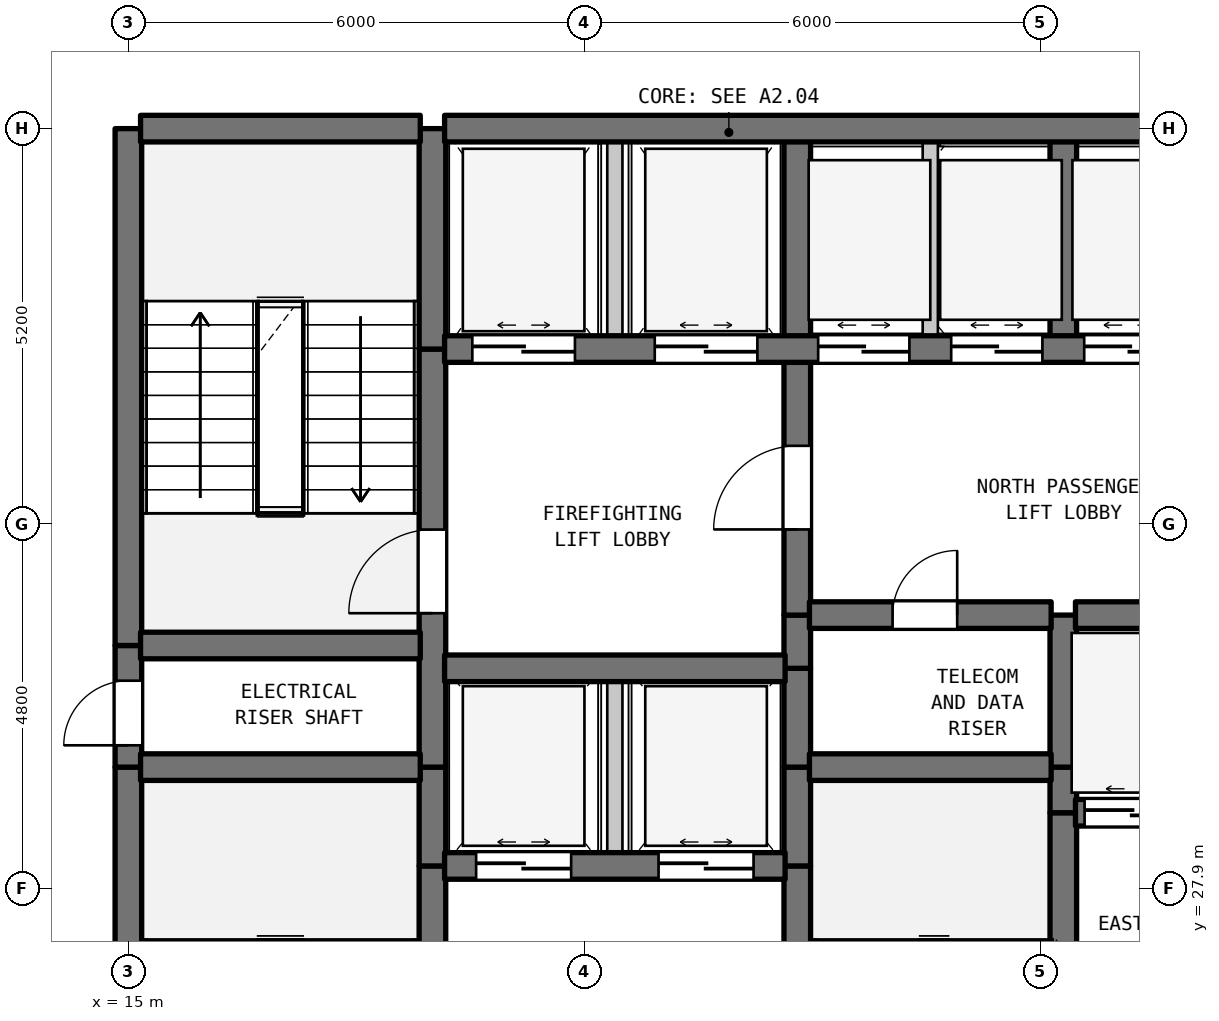
"""IFC4 building model, lengths in metres.
Left out: names, types, materials, properties, quantities, classifications, styles, units other than length and angle.
Written with IfcOpenShell. Run it as: python <this file> out.ifc"""

import sys

from ifc_helpers import new_model, si_unit, direction, frame, frame_2d, origin, place, context, subcontext, project, spatial, rectangle, extrude, element, fill, save


model = new_model("IFC4")
c1 = context("Model", 3, precision=1e-05, world=origin(), true_north=direction((0.0, 1.0)))
c2 = subcontext(c1, "Body", "Model", "MODEL_VIEW")
j1 = project(units=[si_unit("LENGTHUNIT", "METRE"), si_unit("PLANEANGLEUNIT", "RADIAN")], contexts=[c1])
p1 = place(None, origin())
s1 = spatial("IfcSite", under=j1, at=p1, CompositionType="ELEMENT")
p2 = place(p1, origin())
s2 = spatial("IfcBuilding", under=s1, at=p2, CompositionType="ELEMENT")
p3 = place(p2, frame((0.0, 0.0, 13.0)))
s3 = spatial("IfcBuildingStorey", under=s2, at=p3, CompositionType="ELEMENT", Elevation=13.0)
p4 = place(p3, frame((15.0, 22.7, 0.0), z_axis=(0.0, 0.0, 1.0), x_axis=(0.0, 1.0, 0.0)))
e1 = element("IfcWall", 1, at=p4, inside=s3, PredefinedType="SHEAR", context=c2, shape_type="SweptSolid", body=[
    extrude(rectangle(XDim=6.8, YDim=0.35, at=frame_2d((3.4, 0.0))), origin(), (0.0, 0.0, 1.0), 5.58),
])
p5 = place(p3, frame((15.0, 29.5, 0.0), z_axis=(0.0, 0.0, 1.0), x_axis=(0.0, 1.0, 0.0)))
e2 = element("IfcWall", 2, at=p5, inside=s3, PredefinedType="SHEAR", context=c2, shape_type="SweptSolid", body=[
    extrude(rectangle(XDim=1.6, YDim=0.35, at=frame_2d((0.8, 0.0))), origin(), (0.0, 0.0, 1.0), 5.58),
])
p6 = place(p5, frame((0.287, 0.0, 0.0)))
e3 = element("IfcOpeningElement", 3, at=p6, cuts=e2, PredefinedType="OPENING", context=c2, shape_type="SweptSolid", body=[
    extrude(rectangle(XDim=0.85, YDim=2.1, at=frame_2d((0.425, 1.05))), frame((0.0, 0.185, 0.0), z_axis=(0.0, -1.0, 0.0), x_axis=(1.0, 0.0, 0.0)), (0.0, 0.0, 1.0), 0.37),
])
p7 = place(p3, frame((15.0, 31.1, 0.0), z_axis=(0.0, 0.0, 1.0), x_axis=(0.0, 1.0, 0.0)))
e4 = element("IfcWall", 4, at=p7, inside=s3, PredefinedType="SHEAR", context=c2, shape_type="SweptSolid", body=[
    extrude(rectangle(XDim=6.8, YDim=0.35, at=frame_2d((3.4, 0.0))), origin(), (0.0, 0.0, 1.0), 5.58),
])
p8 = place(p3, frame((19.0, 22.7, 0.0), z_axis=(0.0, 0.0, 1.0), x_axis=(0.0, 1.0, 0.0)))
e5 = element("IfcWall", 5, at=p8, inside=s3, PredefinedType="SHEAR", context=c2, shape_type="SweptSolid", body=[
    extrude(rectangle(XDim=5.5, YDim=0.35, at=frame_2d((2.75, 0.0))), origin(), (0.0, 0.0, 1.0), 5.58),
])
p9 = place(p8, frame((0.631, 0.0, 0.0)))
e6 = element("IfcOpeningElement", 6, at=p9, cuts=e5, PredefinedType="OPENING", context=c2, shape_type="SweptSolid", body=[
    extrude(rectangle(XDim=1.1, YDim=2.15, at=frame_2d((0.55, 1.075))), frame((0.0, 0.185, 0.0), z_axis=(0.0, -1.0, 0.0), x_axis=(1.0, 0.0, 0.0)), (0.0, 0.0, 1.0), 0.37),
])
p10 = place(p3, frame((19.0, 28.2, 0.0), z_axis=(0.0, 0.0, 1.0), x_axis=(0.0, 1.0, 0.0)))
e7 = element("IfcWall", 7, at=p10, inside=s3, PredefinedType="SHEAR", context=c2, shape_type="SweptSolid", body=[
    extrude(rectangle(XDim=1.3, YDim=0.35, at=frame_2d((0.65, 0.0))), origin(), (0.0, 0.0, 1.0), 5.58),
])
p11 = place(p3, frame((19.0, 29.5, 0.0), z_axis=(0.0, 0.0, 1.0), x_axis=(0.0, 1.0, 0.0)))
e8 = element("IfcWall", 8, at=p11, inside=s3, PredefinedType="SHEAR", context=c2, shape_type="SweptSolid", body=[
    extrude(rectangle(XDim=5.5, YDim=0.35, at=frame_2d((2.75, 0.0))), origin(), (0.0, 0.0, 1.0), 5.58),
])
p12 = place(p11, frame((2.025, 0.0, 0.0)))
e9 = element("IfcOpeningElement", 9, at=p12, cuts=e8, PredefinedType="OPENING", context=c2, shape_type="SweptSolid", body=[
    extrude(rectangle(XDim=1.1, YDim=2.15, at=frame_2d((0.55, 1.075))), frame((0.0, 0.185, 0.0), z_axis=(0.0, -1.0, 0.0), x_axis=(1.0, 0.0, 0.0)), (0.0, 0.0, 1.0), 0.37),
])
p13 = place(p3, frame((19.0, 35.0, 0.0), z_axis=(0.0, 0.0, 1.0), x_axis=(0.0, 1.0, 0.0)))
e10 = element("IfcWall", 10, at=p13, inside=s3, PredefinedType="SHEAR", context=c2, shape_type="SweptSolid", body=[
    extrude(rectangle(XDim=2.9, YDim=0.35, at=frame_2d((1.45, 0.0))), origin(), (0.0, 0.0, 1.0), 5.58),
])
p14 = place(p3, frame((21.4, 28.2, 0.0), z_axis=(0.0, 0.0, 1.0), x_axis=(0.0, 1.0, 0.0)))
e11 = element("IfcWall", 11, at=p14, inside=s3, PredefinedType="STANDARD", context=c2, shape_type="SweptSolid", body=[
    extrude(rectangle(XDim=2.6, YDim=0.2, at=frame_2d((1.3, 0.0))), origin(), (0.0, 0.0, 1.0), 5.58),
])
p15 = place(p3, frame((21.4, 35.0, 0.0), z_axis=(0.0, 0.0, 1.0), x_axis=(0.0, 1.0, 0.0)))
e12 = element("IfcWall", 12, at=p15, inside=s3, PredefinedType="STANDARD", context=c2, shape_type="SweptSolid", body=[
    extrude(rectangle(XDim=2.9, YDim=0.2, at=frame_2d((1.45, 0.0))), origin(), (0.0, 0.0, 1.0), 5.58),
])
p16 = place(p3, frame((23.8, 22.7, 0.0), z_axis=(0.0, 0.0, 1.0), x_axis=(0.0, 1.0, 0.0)))
e13 = element("IfcWall", 13, at=p16, inside=s3, PredefinedType="SHEAR", context=c2, shape_type="SweptSolid", body=[
    extrude(rectangle(XDim=5.5, YDim=0.35, at=frame_2d((2.75, 0.0))), origin(), (0.0, 0.0, 1.0), 5.58),
])
p17 = place(p16, frame((0.235, 0.0, 0.0)))
e14 = element("IfcOpeningElement", 14, at=p17, cuts=e13, PredefinedType="OPENING", context=c2, shape_type="SweptSolid", body=[
    extrude(rectangle(XDim=1.1, YDim=2.15, at=frame_2d((0.55, 1.075))), frame((0.0, 0.185, 0.0), z_axis=(0.0, -1.0, 0.0), x_axis=(1.0, 0.0, 0.0)), (0.0, 0.0, 1.0), 0.37),
])
for number, where, z_axis, x_axis in (
    (15, (23.8, 28.2, 0.0), (0.0, 0.0, 1.0), (0.0, 1.0, 0.0)),
    (16, (23.8, 29.5, 0.0), (0.0, 0.0, 1.0), (0.0, 1.0, 0.0)),
):
    element("IfcWall", number, at=place(p3, frame(where, z_axis=z_axis, x_axis=x_axis)), inside=s3, PredefinedType="SHEAR", context=c2, shape_type="SweptSolid", body=[
        extrude(rectangle(XDim=1.3, YDim=0.35, at=frame_2d((0.65, 0.0))), origin(), (0.0, 0.0, 1.0), 5.58),
    ])
p18 = place(p3, frame((23.8, 30.8, 0.0), z_axis=(0.0, 0.0, 1.0), x_axis=(0.0, 1.0, 0.0)))
e17 = element("IfcWall", 17, at=p18, inside=s3, PredefinedType="SHEAR", context=c2, shape_type="SweptSolid", body=[
    extrude(rectangle(XDim=0.7, YDim=0.35, at=frame_2d((0.35, 0.0))), origin(), (0.0, 0.0, 1.0), 5.58),
])
p19 = place(p3, frame((23.8, 31.5, 0.0), z_axis=(0.0, 0.0, 1.0), x_axis=(0.0, 1.0, 0.0)))
e18 = element("IfcWall", 18, at=p19, inside=s3, PredefinedType="SHEAR", context=c2, shape_type="SweptSolid", body=[
    extrude(rectangle(XDim=3.5, YDim=0.35, at=frame_2d((1.75, 0.0))), origin(), (0.0, 0.0, 1.0), 5.58),
])
p20 = place(p19, frame((1.127, 0.0, 0.0)))
e19 = element("IfcOpeningElement", 19, at=p20, cuts=e18, PredefinedType="OPENING", context=c2, shape_type="SweptSolid", body=[
    extrude(rectangle(XDim=1.1, YDim=2.15, at=frame_2d((0.55, 1.075))), frame((0.0, 0.185, 0.0), z_axis=(0.0, -1.0, 0.0), x_axis=(1.0, 0.0, 0.0)), (0.0, 0.0, 1.0), 0.37),
])
p21 = place(p3, frame((23.8, 35.0, 0.0), z_axis=(0.0, 0.0, 1.0), x_axis=(0.0, 1.0, 0.0)))
e20 = element("IfcWall", 20, at=p21, inside=s3, PredefinedType="SHEAR", context=c2, shape_type="SweptSolid", body=[
    extrude(rectangle(XDim=2.9, YDim=0.35, at=frame_2d((1.45, 0.0))), origin(), (0.0, 0.0, 1.0), 5.58),
])
p22 = place(p3, frame((25.55, 35.0, 0.0), z_axis=(0.0, 0.0, 1.0), x_axis=(0.0, 1.0, 0.0)))
e21 = element("IfcWall", 21, at=p22, inside=s3, PredefinedType="STANDARD", context=c2, shape_type="SweptSolid", body=[
    extrude(rectangle(XDim=2.9, YDim=0.2, at=frame_2d((1.45, 0.0))), origin(), (0.0, 0.0, 1.0), 5.58),
])
p23 = place(p3, frame((27.3, 25.6, 0.0), z_axis=(0.0, 0.0, 1.0), x_axis=(0.0, 1.0, 0.0)))
e22 = element("IfcWall", 22, at=p23, inside=s3, PredefinedType="SHEAR", context=c2, shape_type="SweptSolid", body=[
    extrude(rectangle(XDim=3.3, YDim=0.35, at=frame_2d((1.65, 0.0))), origin(), (0.0, 0.0, 1.0), 5.58),
])
p24 = place(p3, frame((27.3, 28.9, 0.0), z_axis=(0.0, 0.0, 1.0), x_axis=(0.0, 1.0, 0.0)))
e23 = element("IfcWall", 23, at=p24, inside=s3, PredefinedType="SHEAR", context=c2, shape_type="SweptSolid", body=[
    extrude(rectangle(XDim=0.6, YDim=0.35, at=frame_2d((0.3, 0.0))), origin(), (0.0, 0.0, 1.0), 5.58),
])
p25 = place(p3, frame((27.3, 29.5, 0.0), z_axis=(0.0, 0.0, 1.0), x_axis=(0.0, 1.0, 0.0)))
e24 = element("IfcWall", 24, at=p25, inside=s3, PredefinedType="SHEAR", context=c2, shape_type="SweptSolid", body=[
    extrude(rectangle(XDim=2.0, YDim=0.35, at=frame_2d((1.0, 0.0))), origin(), (0.0, 0.0, 1.0), 5.58),
])
p26 = place(p3, frame((27.3, 35.0, 0.0), z_axis=(0.0, 0.0, 1.0), x_axis=(0.0, 1.0, 0.0)))
e25 = element("IfcWall", 25, at=p26, inside=s3, PredefinedType="SHEAR", context=c2, shape_type="SweptSolid", body=[
    extrude(rectangle(XDim=2.9, YDim=0.35, at=frame_2d((1.45, 0.0))), origin(), (0.0, 0.0, 1.0), 5.58),
])
p27 = place(p3, frame((19.16, 28.2, 0.0), z_axis=(0.0, 0.0, 1.0), x_axis=(1.0, 0.0, 0.0)))
e26 = element("IfcWall", 26, at=p27, inside=s3, PredefinedType="SHEAR", context=c2, shape_type="SweptSolid", body=[
    extrude(rectangle(XDim=4.48, YDim=0.35, at=frame_2d((2.24, 0.0))), origin(), (0.0, 0.0, 1.0), 5.58),
])
p28 = place(p27, frame((0.415, 0.0, 0.0)))
e27 = element("IfcOpeningElement", 27, at=p28, cuts=e26, PredefinedType="OPENING", context=c2, shape_type="SweptSolid", body=[
    extrude(rectangle(XDim=1.25, YDim=2.2, at=frame_2d((0.625, 1.1))), frame((0.0, 0.185, 0.0), z_axis=(0.0, -1.0, 0.0), x_axis=(1.0, 0.0, 0.0)), (0.0, 0.0, 1.0), 0.37),
])
p29 = place(p27, frame((2.815, 0.0, 0.0)))
e28 = element("IfcOpeningElement", 28, at=p29, cuts=e26, PredefinedType="OPENING", context=c2, shape_type="SweptSolid", body=[
    extrude(rectangle(XDim=1.25, YDim=2.2, at=frame_2d((0.625, 1.1))), frame((0.0, 0.185, 0.0), z_axis=(0.0, -1.0, 0.0), x_axis=(1.0, 0.0, 0.0)), (0.0, 0.0, 1.0), 0.37),
])
p30 = place(p3, frame((27.46, 28.9, 0.0), z_axis=(0.0, 0.0, 1.0), x_axis=(1.0, 0.0, 0.0)))
e29 = element("IfcWall", 29, at=p30, inside=s3, PredefinedType="SHEAR", context=c2, shape_type="SweptSolid", body=[
    extrude(rectangle(XDim=3.18, YDim=0.35, at=frame_2d((1.59, 0.0))), origin(), (0.0, 0.0, 1.0), 5.58),
])
p31 = place(p30, frame((0.12, 0.0, 0.0)))
e30 = element("IfcOpeningElement", 30, at=p31, cuts=e29, PredefinedType="OPENING", context=c2, shape_type="SweptSolid", body=[
    extrude(rectangle(XDim=1.25, YDim=2.2, at=frame_2d((0.625, 1.1))), frame((0.0, 0.185, 0.0), z_axis=(0.0, -1.0, 0.0), x_axis=(1.0, 0.0, 0.0)), (0.0, 0.0, 1.0), 0.37),
])
p32 = place(p30, frame((1.81, 0.0, 0.0)))
e31 = element("IfcOpeningElement", 31, at=p32, cuts=e29, PredefinedType="OPENING", context=c2, shape_type="SweptSolid", body=[
    extrude(rectangle(XDim=1.25, YDim=2.2, at=frame_2d((0.625, 1.1))), frame((0.0, 0.185, 0.0), z_axis=(0.0, -1.0, 0.0), x_axis=(1.0, 0.0, 0.0)), (0.0, 0.0, 1.0), 0.37),
])
p33 = place(p3, frame((15.16, 29.5, 0.0), z_axis=(0.0, 0.0, 1.0), x_axis=(1.0, 0.0, 0.0)))
e32 = element("IfcWall", 32, at=p33, inside=s3, PredefinedType="SHEAR", context=c2, shape_type="SweptSolid", body=[
    extrude(rectangle(XDim=3.68, YDim=0.35, at=frame_2d((1.84, 0.0))), origin(), (0.0, 0.0, 1.0), 5.58),
])
p34 = place(p3, frame((23.96, 29.5, 0.0), z_axis=(0.0, 0.0, 1.0), x_axis=(1.0, 0.0, 0.0)))
e33 = element("IfcWall", 33, at=p34, inside=s3, PredefinedType="SHEAR", context=c2, shape_type="SweptSolid", body=[
    extrude(rectangle(XDim=3.18, YDim=0.35, at=frame_2d((1.59, 0.0))), origin(), (0.0, 0.0, 1.0), 5.58),
])
p35 = place(p3, frame((19.16, 30.8, 0.0), z_axis=(0.0, 0.0, 1.0), x_axis=(1.0, 0.0, 0.0)))
e34 = element("IfcWall", 34, at=p35, inside=s3, PredefinedType="SHEAR", context=c2, shape_type="SweptSolid", body=[
    extrude(rectangle(XDim=4.48, YDim=0.35, at=frame_2d((2.24, 0.0))), origin(), (0.0, 0.0, 1.0), 5.58),
])
p36 = place(p3, frame((15.16, 31.1, 0.0), z_axis=(0.0, 0.0, 1.0), x_axis=(1.0, 0.0, 0.0)))
e35 = element("IfcWall", 35, at=p36, inside=s3, PredefinedType="SHEAR", context=c2, shape_type="SweptSolid", body=[
    extrude(rectangle(XDim=3.68, YDim=0.35, at=frame_2d((1.84, 0.0))), origin(), (0.0, 0.0, 1.0), 5.58),
])
p37 = place(p3, frame((23.96, 31.5, 0.0), z_axis=(0.0, 0.0, 1.0), x_axis=(1.0, 0.0, 0.0)))
e36 = element("IfcWall", 36, at=p37, inside=s3, PredefinedType="SHEAR", context=c2, shape_type="SweptSolid", body=[
    extrude(rectangle(XDim=3.18, YDim=0.35, at=frame_2d((1.59, 0.0))), origin(), (0.0, 0.0, 1.0), 5.58),
])
p38 = place(p37, frame((1.094, 0.0, 0.0)))
e37 = element("IfcOpeningElement", 37, at=p38, cuts=e36, PredefinedType="OPENING", context=c2, shape_type="SweptSolid", body=[
    extrude(rectangle(XDim=0.85, YDim=2.1, at=frame_2d((0.425, 1.05))), frame((0.0, 0.185, 0.0), z_axis=(0.0, -1.0, 0.0), x_axis=(1.0, 0.0, 0.0)), (0.0, 0.0, 1.0), 0.37),
])
p39 = place(p3, frame((27.46, 31.5, 0.0), z_axis=(0.0, 0.0, 1.0), x_axis=(1.0, 0.0, 0.0)))
e38 = element("IfcWall", 38, at=p39, inside=s3, PredefinedType="SHEAR", context=c2, shape_type="SweptSolid", body=[
    extrude(rectangle(XDim=3.18, YDim=0.35, at=frame_2d((1.59, 0.0))), origin(), (0.0, 0.0, 1.0), 5.58),
])
p40 = place(p3, frame((19.16, 35.0, 0.0), z_axis=(0.0, 0.0, 1.0), x_axis=(1.0, 0.0, 0.0)))
e39 = element("IfcWall", 39, at=p40, inside=s3, PredefinedType="SHEAR", context=c2, shape_type="SweptSolid", body=[
    extrude(rectangle(XDim=11.48, YDim=0.35, at=frame_2d((5.74, 0.0))), origin(), (0.0, 0.0, 1.0), 5.58),
])
p41 = place(p40, frame((0.365, 0.0, 0.0)))
e40 = element("IfcOpeningElement", 40, at=p41, cuts=e39, PredefinedType="OPENING", context=c2, shape_type="SweptSolid", body=[
    extrude(rectangle(XDim=1.35, YDim=2.2, at=frame_2d((0.675, 1.1))), frame((0.0, 0.185, 0.0), z_axis=(0.0, -1.0, 0.0), x_axis=(1.0, 0.0, 0.0)), (0.0, 0.0, 1.0), 0.37),
])
p42 = place(p40, frame((2.765, 0.0, 0.0)))
e41 = element("IfcOpeningElement", 41, at=p42, cuts=e39, PredefinedType="OPENING", context=c2, shape_type="SweptSolid", body=[
    extrude(rectangle(XDim=1.35, YDim=2.2, at=frame_2d((0.675, 1.1))), frame((0.0, 0.185, 0.0), z_axis=(0.0, -1.0, 0.0), x_axis=(1.0, 0.0, 0.0)), (0.0, 0.0, 1.0), 0.37),
])
p43 = place(p40, frame((4.915, 0.0, 0.0)))
e42 = element("IfcOpeningElement", 42, at=p43, cuts=e39, PredefinedType="OPENING", context=c2, shape_type="SweptSolid", body=[
    extrude(rectangle(XDim=1.2, YDim=2.2, at=frame_2d((0.6, 1.1))), frame((0.0, 0.185, 0.0), z_axis=(0.0, -1.0, 0.0), x_axis=(1.0, 0.0, 0.0)), (0.0, 0.0, 1.0), 0.37),
])
p44 = place(p40, frame((6.665, 0.0, 0.0)))
e43 = element("IfcOpeningElement", 43, at=p44, cuts=e39, PredefinedType="OPENING", context=c2, shape_type="SweptSolid", body=[
    extrude(rectangle(XDim=1.2, YDim=2.2, at=frame_2d((0.6, 1.1))), frame((0.0, 0.185, 0.0), z_axis=(0.0, -1.0, 0.0), x_axis=(1.0, 0.0, 0.0)), (0.0, 0.0, 1.0), 0.37),
])
p45 = place(p40, frame((8.415, 0.0, 0.0)))
e44 = element("IfcOpeningElement", 44, at=p45, cuts=e39, PredefinedType="OPENING", context=c2, shape_type="SweptSolid", body=[
    extrude(rectangle(XDim=1.2, YDim=2.2, at=frame_2d((0.6, 1.1))), frame((0.0, 0.185, 0.0), z_axis=(0.0, -1.0, 0.0), x_axis=(1.0, 0.0, 0.0)), (0.0, 0.0, 1.0), 0.37),
])
p46 = place(p40, frame((10.16, 0.0, 0.0)))
e45 = element("IfcOpeningElement", 45, at=p46, cuts=e39, PredefinedType="OPENING", context=c2, shape_type="SweptSolid", body=[
    extrude(rectangle(XDim=1.2, YDim=2.2, at=frame_2d((0.6, 1.1))), frame((0.0, 0.185, 0.0), z_axis=(0.0, -1.0, 0.0), x_axis=(1.0, 0.0, 0.0)), (0.0, 0.0, 1.0), 0.37),
])
p47 = place(p3, frame((15.16, 37.9, 0.0), z_axis=(0.0, 0.0, 1.0), x_axis=(1.0, 0.0, 0.0)))
e46 = element("IfcWall", 46, at=p47, inside=s3, PredefinedType="SHEAR", context=c2, shape_type="SweptSolid", body=[
    extrude(rectangle(XDim=3.68, YDim=0.35, at=frame_2d((1.84, 0.0))), origin(), (0.0, 0.0, 1.0), 5.58),
])
p48 = place(p3, frame((19.16, 37.9, 0.0), z_axis=(0.0, 0.0, 1.0), x_axis=(1.0, 0.0, 0.0)))
e47 = element("IfcWall", 47, at=p48, inside=s3, PredefinedType="SHEAR", context=c2, shape_type="SweptSolid", body=[
    extrude(rectangle(XDim=11.48, YDim=0.35, at=frame_2d((5.74, 0.0))), origin(), (0.0, 0.0, 1.0), 5.58),
])
p49 = place(p6, origin())
e48 = element("IfcDoor", 48, at=p49, inside=s3, OperationType="SINGLE_SWING_LEFT", PredefinedType="DOOR", context=c2, shape_type="SweptSolid", body=[
    extrude(rectangle(XDim=0.85, YDim=2.1, at=frame_2d((0.425, 1.05))), frame((0.0, 0.025, 0.0), z_axis=(0.0, -1.0, 0.0), x_axis=(1.0, 0.0, 0.0)), (0.0, 0.0, 1.0), 0.05),
])
fill(e3, e48)
p50 = place(p12, origin())
e49 = element("IfcDoor", 49, at=p50, inside=s3, OperationType="SINGLE_SWING_LEFT", PredefinedType="DOOR", context=c2, shape_type="SweptSolid", body=[
    extrude(rectangle(XDim=1.1, YDim=2.15, at=frame_2d((0.55, 1.075))), frame((0.0, 0.025, 0.0), z_axis=(0.0, -1.0, 0.0), x_axis=(1.0, 0.0, 0.0)), (0.0, 0.0, 1.0), 0.05),
])
fill(e9, e49)
p51 = place(p20, origin())
e50 = element("IfcDoor", 50, at=p51, inside=s3, OperationType="SINGLE_SWING_LEFT", PredefinedType="DOOR", context=c2, shape_type="SweptSolid", body=[
    extrude(rectangle(XDim=1.1, YDim=2.15, at=frame_2d((0.55, 1.075))), frame((0.0, 0.025, 0.0), z_axis=(0.0, -1.0, 0.0), x_axis=(1.0, 0.0, 0.0)), (0.0, 0.0, 1.0), 0.05),
])
fill(e19, e50)
p52 = place(p28, origin())
e51 = element("IfcDoor", 51, at=p52, inside=s3, OperationType="DOUBLE_DOOR_SLIDING", PredefinedType="DOOR", context=c2, shape_type="SweptSolid", body=[
    extrude(rectangle(XDim=1.25, YDim=2.2, at=frame_2d((0.625, 1.1))), frame((0.0, 0.025, 0.0), z_axis=(0.0, -1.0, 0.0), x_axis=(1.0, 0.0, 0.0)), (0.0, 0.0, 1.0), 0.05),
])
fill(e27, e51)
p53 = place(p29, origin())
e52 = element("IfcDoor", 52, at=p53, inside=s3, OperationType="DOUBLE_DOOR_SLIDING", PredefinedType="DOOR", context=c2, shape_type="SweptSolid", body=[
    extrude(rectangle(XDim=1.25, YDim=2.2, at=frame_2d((0.625, 1.1))), frame((0.0, 0.025, 0.0), z_axis=(0.0, -1.0, 0.0), x_axis=(1.0, 0.0, 0.0)), (0.0, 0.0, 1.0), 0.05),
])
fill(e28, e52)
p54 = place(p31, origin())
e53 = element("IfcDoor", 53, at=p54, inside=s3, OperationType="DOUBLE_DOOR_SLIDING", PredefinedType="DOOR", context=c2, shape_type="SweptSolid", body=[
    extrude(rectangle(XDim=1.25, YDim=2.2, at=frame_2d((0.625, 1.1))), frame((0.0, 0.025, 0.0), z_axis=(0.0, -1.0, 0.0), x_axis=(1.0, 0.0, 0.0)), (0.0, 0.0, 1.0), 0.05),
])
fill(e30, e53)
p55 = place(p38, origin())
e54 = element("IfcDoor", 54, at=p55, inside=s3, OperationType="SINGLE_SWING_RIGHT", PredefinedType="DOOR", context=c2, shape_type="SweptSolid", body=[
    extrude(rectangle(XDim=0.85, YDim=2.1, at=frame_2d((0.425, 1.05))), frame((0.0, 0.025, 0.0), z_axis=(0.0, -1.0, 0.0), x_axis=(1.0, 0.0, 0.0)), (0.0, 0.0, 1.0), 0.05),
])
fill(e37, e54)
p56 = place(p41, origin())
e55 = element("IfcDoor", 55, at=p56, inside=s3, OperationType="DOUBLE_DOOR_SLIDING", PredefinedType="DOOR", context=c2, shape_type="SweptSolid", body=[
    extrude(rectangle(XDim=1.35, YDim=2.2, at=frame_2d((0.675, 1.1))), frame((0.0, 0.025, 0.0), z_axis=(0.0, -1.0, 0.0), x_axis=(1.0, 0.0, 0.0)), (0.0, 0.0, 1.0), 0.05),
])
fill(e40, e55)
p57 = place(p42, origin())
e56 = element("IfcDoor", 56, at=p57, inside=s3, OperationType="DOUBLE_DOOR_SLIDING", PredefinedType="DOOR", context=c2, shape_type="SweptSolid", body=[
    extrude(rectangle(XDim=1.35, YDim=2.2, at=frame_2d((0.675, 1.1))), frame((0.0, 0.025, 0.0), z_axis=(0.0, -1.0, 0.0), x_axis=(1.0, 0.0, 0.0)), (0.0, 0.0, 1.0), 0.05),
])
fill(e41, e56)
p58 = place(p43, origin())
e57 = element("IfcDoor", 57, at=p58, inside=s3, OperationType="DOUBLE_DOOR_SLIDING", PredefinedType="DOOR", context=c2, shape_type="SweptSolid", body=[
    extrude(rectangle(XDim=1.2, YDim=2.2, at=frame_2d((0.6, 1.1))), frame((0.0, 0.025, 0.0), z_axis=(0.0, -1.0, 0.0), x_axis=(1.0, 0.0, 0.0)), (0.0, 0.0, 1.0), 0.05),
])
fill(e42, e57)
p59 = place(p44, origin())
e58 = element("IfcDoor", 58, at=p59, inside=s3, OperationType="DOUBLE_DOOR_SLIDING", PredefinedType="DOOR", context=c2, shape_type="SweptSolid", body=[
    extrude(rectangle(XDim=1.2, YDim=2.2, at=frame_2d((0.6, 1.1))), frame((0.0, 0.025, 0.0), z_axis=(0.0, -1.0, 0.0), x_axis=(1.0, 0.0, 0.0)), (0.0, 0.0, 1.0), 0.05),
])
fill(e43, e58)
p60 = place(p45, origin())
e59 = element("IfcDoor", 59, at=p60, inside=s3, OperationType="DOUBLE_DOOR_SLIDING", PredefinedType="DOOR", context=c2, shape_type="SweptSolid", body=[
    extrude(rectangle(XDim=1.2, YDim=2.2, at=frame_2d((0.6, 1.1))), frame((0.0, 0.025, 0.0), z_axis=(0.0, -1.0, 0.0), x_axis=(1.0, 0.0, 0.0)), (0.0, 0.0, 1.0), 0.05),
])
fill(e44, e59)
save(model, sys.argv[1])
